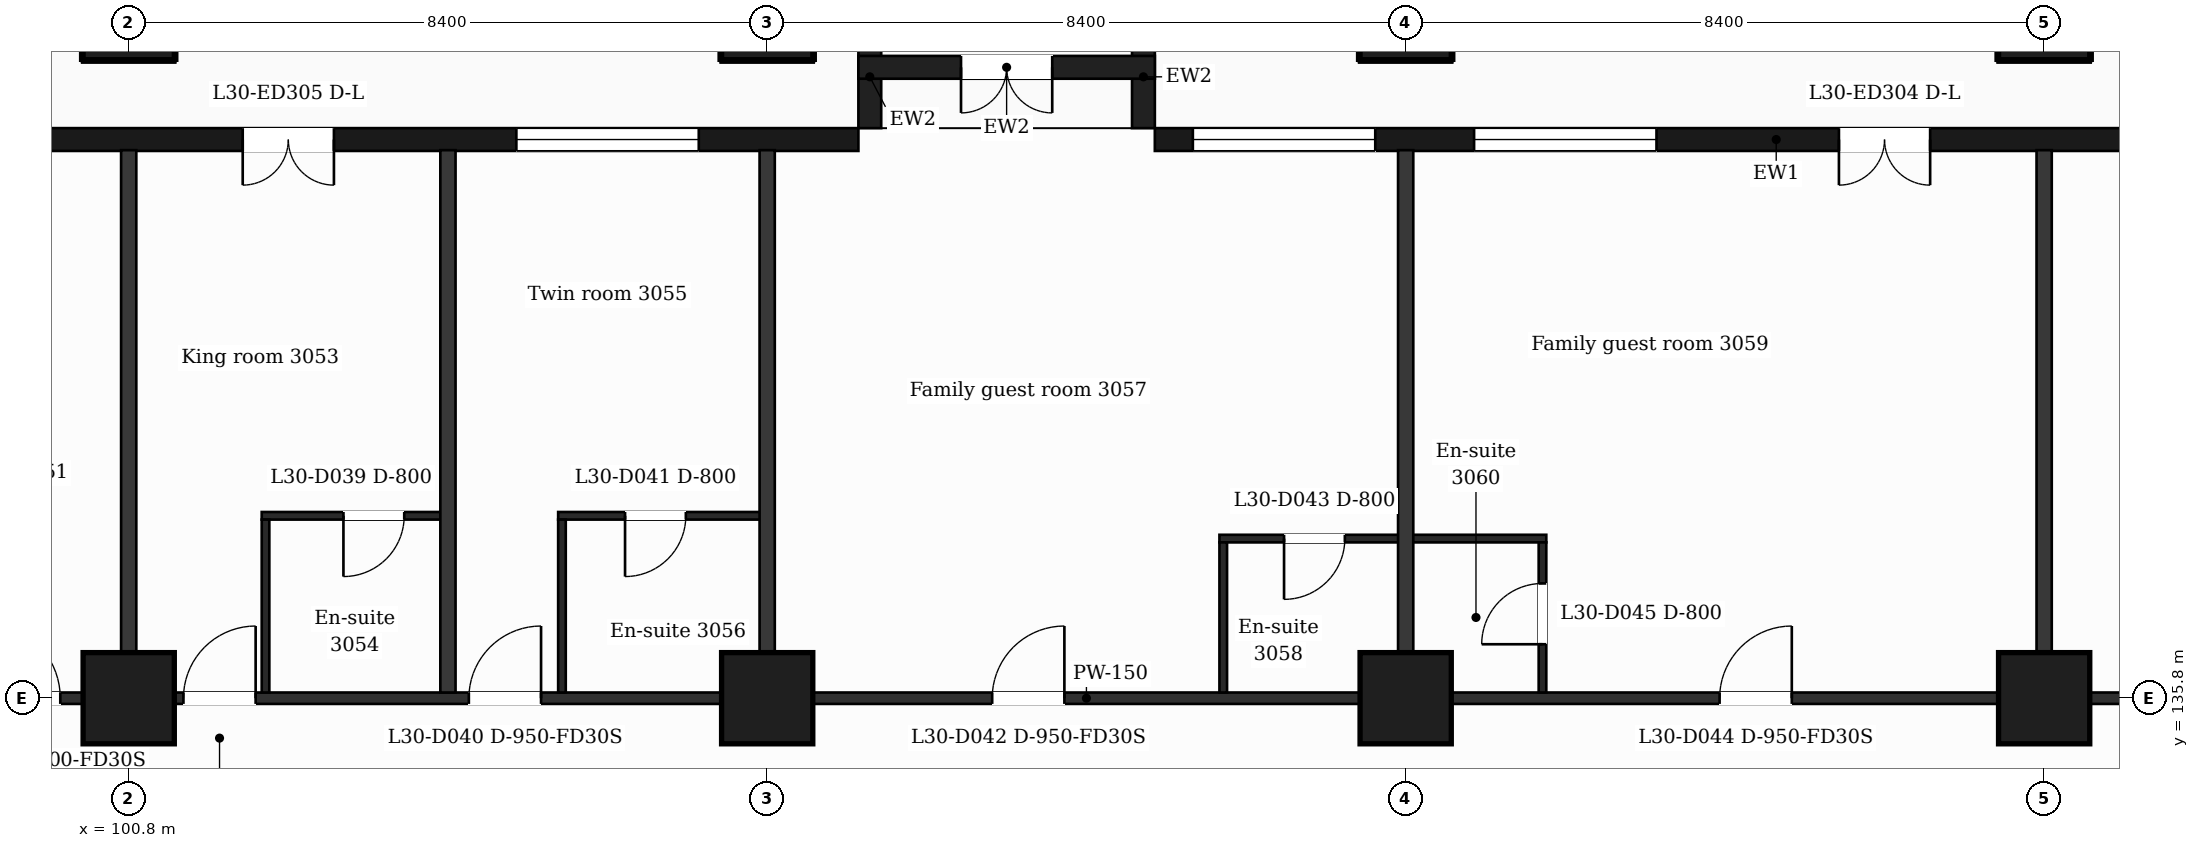
"""IFC4 building model, lengths in metres.
Left out: names, types, materials, properties, quantities, classifications, styles, units other than length and angle.
Written with IfcOpenShell. Run it as: python <this file> out.ifc"""

import sys

from ifc_helpers import new_model, si_unit, direction, frame, frame_2d, origin, origin_2d, place, context, subcontext, project, spatial, rectangle, extrude, element, fill, save


model = new_model("IFC4")
c1 = context("Model", 3, precision=1e-05, world=origin(), true_north=direction((0.0, 1.0)))
c2 = subcontext(c1, "Body", "Model", "MODEL_VIEW")
j1 = project(units=[si_unit("LENGTHUNIT", "METRE"), si_unit("PLANEANGLEUNIT", "RADIAN")], contexts=[c1])
p1 = place(None, origin())
s1 = spatial("IfcSite", under=j1, at=p1, CompositionType="ELEMENT")
p2 = place(p1, origin())
s2 = spatial("IfcBuilding", under=s1, at=p2, CompositionType="ELEMENT")
p3 = place(p2, frame((0.0, 0.0, 128.0)))
s3 = spatial("IfcBuildingStorey", under=s2, at=p3, CompositionType="ELEMENT", Elevation=128.0)
for number, where, z_axis, x_axis in (
    (1, (100.8, 135.8, 0.0), (0.0, 0.0, 1.0), (1.0, 0.0, 0.0)),
    (2, (109.2, 135.8, 0.0), (0.0, 0.0, 1.0), (1.0, 0.0, 0.0)),
    (3, (117.6, 135.8, 0.0), (0.0, 0.0, 1.0), (1.0, 0.0, 0.0)),
    (4, (126.0, 135.8, 0.0), (0.0, 0.0, 1.0), (1.0, 0.0, 0.0)),
    (5, (100.8, 144.8, 0.0), (0.0, 0.0, 1.0), (1.0, 0.0, 0.0)),
    (6, (109.2, 144.8, 0.0), (0.0, 0.0, 1.0), (1.0, 0.0, 0.0)),
    (7, (117.6, 144.8, 0.0), (0.0, 0.0, 1.0), (1.0, 0.0, 0.0)),
    (8, (126.0, 144.8, 0.0), (0.0, 0.0, 1.0), (1.0, 0.0, 0.0)),
):
    element("IfcColumn", number, at=place(p3, frame(where, z_axis=z_axis, x_axis=x_axis)), inside=s3, PredefinedType="COLUMN", context=c2, shape_type="SweptSolid", body=[
        extrude(rectangle(XDim=1.2, YDim=1.2, at=origin_2d()), origin(), (0.0, 0.0, 1.0), 3.7),
    ])
p4 = place(p3, frame((130.65, 143.15, 0.0), z_axis=(0.0, 0.0, 1.0), x_axis=(-1.0, 0.0, 0.0)))
e9 = element("IfcWall", 9, at=p4, inside=s3, PredefinedType="SOLIDWALL", context=c2, shape_type="SweptSolid", body=[
    extrude(rectangle(XDim=16.35, YDim=0.3, at=frame_2d((8.175, 0.0))), origin(), (0.0, 0.0, 1.0), 3.38),
])
p5 = place(p4, frame((1.95, 0.0, 0.9)))
e10 = element("IfcOpeningElement", 10, at=p5, cuts=e9, PredefinedType="OPENING", context=c2, shape_type="SweptSolid", body=[
    extrude(rectangle(XDim=1.2, YDim=2.1, at=frame_2d((0.6, 1.05))), frame((0.0, 0.16, 0.0), z_axis=(0.0, -1.0, 0.0), x_axis=(1.0, 0.0, 0.0)), (0.0, 0.0, 1.0), 0.32),
])
p6 = place(p4, frame((6.15, 0.0, 0.0)))
e11 = element("IfcOpeningElement", 11, at=p6, cuts=e9, PredefinedType="OPENING", context=c2, shape_type="SweptSolid", body=[
    extrude(rectangle(XDim=1.2, YDim=2.4, at=frame_2d((0.6, 1.2))), frame((0.0, 0.16, 0.0), z_axis=(0.0, -1.0, 0.0), x_axis=(1.0, 0.0, 0.0)), (0.0, 0.0, 1.0), 0.32),
])
p7 = place(p4, frame((9.75, 0.0, 0.9)))
e12 = element("IfcOpeningElement", 12, at=p7, cuts=e9, PredefinedType="OPENING", context=c2, shape_type="SweptSolid", body=[
    extrude(rectangle(XDim=2.4, YDim=2.1, at=frame_2d((1.2, 1.05))), frame((0.0, 0.16, 0.0), z_axis=(0.0, -1.0, 0.0), x_axis=(1.0, 0.0, 0.0)), (0.0, 0.0, 1.0), 0.32),
])
p8 = place(p4, frame((13.45, 0.0, 0.9)))
e13 = element("IfcOpeningElement", 13, at=p8, cuts=e9, PredefinedType="OPENING", context=c2, shape_type="SweptSolid", body=[
    extrude(rectangle(XDim=2.4, YDim=2.1, at=frame_2d((1.2, 1.05))), frame((0.0, 0.16, 0.0), z_axis=(0.0, -1.0, 0.0), x_axis=(1.0, 0.0, 0.0)), (0.0, 0.0, 1.0), 0.32),
])
p9 = place(p3, frame((110.4, 143.15, 0.0), z_axis=(0.0, 0.0, 1.0), x_axis=(-1.0, 0.0, 0.0)))
e14 = element("IfcWall", 14, at=p9, inside=s3, PredefinedType="SOLIDWALL", context=c2, shape_type="SweptSolid", body=[
    extrude(rectangle(XDim=14.4, YDim=0.3, at=frame_2d((7.2, 0.0))), origin(), (0.0, 0.0, 1.0), 3.38),
])
p10 = place(p9, frame((2.1, 0.0, 0.9)))
e15 = element("IfcOpeningElement", 15, at=p10, cuts=e14, PredefinedType="OPENING", context=c2, shape_type="SweptSolid", body=[
    extrude(rectangle(XDim=2.4, YDim=2.1, at=frame_2d((1.2, 1.05))), frame((0.0, 0.16, 0.0), z_axis=(0.0, -1.0, 0.0), x_axis=(1.0, 0.0, 0.0)), (0.0, 0.0, 1.0), 0.32),
])
p11 = place(p9, frame((6.9, 0.0, 0.0)))
e16 = element("IfcOpeningElement", 16, at=p11, cuts=e14, PredefinedType="OPENING", context=c2, shape_type="SweptSolid", body=[
    extrude(rectangle(XDim=1.2, YDim=2.4, at=frame_2d((0.6, 1.2))), frame((0.0, 0.16, 0.0), z_axis=(0.0, -1.0, 0.0), x_axis=(1.0, 0.0, 0.0)), (0.0, 0.0, 1.0), 0.32),
])
p12 = place(p9, frame((11.1, 0.0, 0.9)))
e17 = element("IfcOpeningElement", 17, at=p12, cuts=e14, PredefinedType="OPENING", context=c2, shape_type="SweptSolid", body=[
    extrude(rectangle(XDim=1.2, YDim=2.1, at=frame_2d((0.6, 1.05))), frame((0.0, 0.16, 0.0), z_axis=(0.0, -1.0, 0.0), x_axis=(1.0, 0.0, 0.0)), (0.0, 0.0, 1.0), 0.32),
])
for number, where, z_axis, x_axis in (
    (18, (114.15, 143.3, 0.0), (0.0, 0.0, 1.0), (0.0, 1.0, 0.0)),
    (19, (110.55, 143.3, 0.0), (0.0, 0.0, 1.0), (0.0, 1.0, 0.0)),
):
    element("IfcWall", number, at=place(p3, frame(where, z_axis=z_axis, x_axis=x_axis)), inside=s3, PredefinedType="SOLIDWALL", context=c2, shape_type="SweptSolid", body=[
        extrude(rectangle(XDim=1.35, YDim=0.3, at=frame_2d((0.675, 0.0))), origin(), (0.0, 0.0, 1.0), 3.38),
    ])
p13 = place(p3, frame((114.3, 144.1, 0.0), z_axis=(0.0, 0.0, 1.0), x_axis=(-1.0, 0.0, 0.0)))
e20 = element("IfcWall", 20, at=p13, inside=s3, PredefinedType="SOLIDWALL", context=c2, shape_type="SweptSolid", body=[
    extrude(rectangle(XDim=3.9, YDim=0.3, at=frame_2d((1.95, 0.0))), origin(), (0.0, 0.0, 1.0), 3.38),
])
p14 = place(p13, frame((1.35, 0.0, 0.0)))
e21 = element("IfcOpeningElement", 21, at=p14, cuts=e20, PredefinedType="OPENING", context=c2, shape_type="SweptSolid", body=[
    extrude(rectangle(XDim=1.2, YDim=2.4, at=frame_2d((0.6, 1.2))), frame((0.0, 0.16, 0.0), z_axis=(0.0, -1.0, 0.0), x_axis=(1.0, 0.0, 0.0)), (0.0, 0.0, 1.0), 0.32),
])
p15 = place(p3, frame((90.895, 135.8, 0.0), z_axis=(0.0, 0.0, 1.0), x_axis=(1.0, 0.0, 0.0)))
e22 = element("IfcWall", 22, at=p15, inside=s3, PredefinedType="PARTITIONING", context=c2, shape_type="SweptSolid", body=[
    extrude(rectangle(XDim=45.011, YDim=0.15, at=frame_2d((22.505, 0.0))), origin(), (0.0, 0.0, 1.0), 3.38),
])
p16 = place(p15, frame((8.005, 0.0, 0.0)))
e23 = element("IfcOpeningElement", 23, at=p16, cuts=e22, PredefinedType="OPENING", context=c2, shape_type="SweptSolid", body=[
    extrude(rectangle(XDim=1.0, YDim=2.1, at=frame_2d((0.5, 1.05))), frame((0.0, 0.085, 0.0), z_axis=(0.0, -1.0, 0.0), x_axis=(1.0, 0.0, 0.0)), (0.0, 0.0, 1.0), 0.17),
])
p17 = place(p15, frame((10.625, 0.0, 0.0)))
e24 = element("IfcOpeningElement", 24, at=p17, cuts=e22, PredefinedType="OPENING", context=c2, shape_type="SweptSolid", body=[
    extrude(rectangle(XDim=0.95, YDim=2.1, at=frame_2d((0.475, 1.05))), frame((0.0, 0.085, 0.0), z_axis=(0.0, -1.0, 0.0), x_axis=(1.0, 0.0, 0.0)), (0.0, 0.0, 1.0), 0.17),
])
p18 = place(p15, frame((14.38, 0.0, 0.0)))
e25 = element("IfcOpeningElement", 25, at=p18, cuts=e22, PredefinedType="OPENING", context=c2, shape_type="SweptSolid", body=[
    extrude(rectangle(XDim=0.95, YDim=2.1, at=frame_2d((0.475, 1.05))), frame((0.0, 0.085, 0.0), z_axis=(0.0, -1.0, 0.0), x_axis=(1.0, 0.0, 0.0)), (0.0, 0.0, 1.0), 0.17),
])
p19 = place(p15, frame((21.265, 0.0, 0.0)))
e26 = element("IfcOpeningElement", 26, at=p19, cuts=e22, PredefinedType="OPENING", context=c2, shape_type="SweptSolid", body=[
    extrude(rectangle(XDim=0.95, YDim=2.1, at=frame_2d((0.475, 1.05))), frame((0.0, 0.085, 0.0), z_axis=(0.0, -1.0, 0.0), x_axis=(1.0, 0.0, 0.0)), (0.0, 0.0, 1.0), 0.17),
])
p20 = place(p15, frame((30.835, 0.0, 0.0)))
e27 = element("IfcOpeningElement", 27, at=p20, cuts=e22, PredefinedType="OPENING", context=c2, shape_type="SweptSolid", body=[
    extrude(rectangle(XDim=0.95, YDim=2.1, at=frame_2d((0.475, 1.05))), frame((0.0, 0.085, 0.0), z_axis=(0.0, -1.0, 0.0), x_axis=(1.0, 0.0, 0.0)), (0.0, 0.0, 1.0), 0.17),
])
p21 = place(p15, frame((39.814, 0.0, 0.0)))
e28 = element("IfcOpeningElement", 28, at=p21, cuts=e22, PredefinedType="OPENING", context=c2, shape_type="SweptSolid", body=[
    extrude(rectangle(XDim=0.95, YDim=2.1, at=frame_2d((0.475, 1.05))), frame((0.0, 0.085, 0.0), z_axis=(0.0, -1.0, 0.0), x_axis=(1.0, 0.0, 0.0)), (0.0, 0.0, 1.0), 0.17),
])
p22 = place(p3, frame((115.15, 137.9, 0.0), z_axis=(0.0, 0.0, 1.0), x_axis=(1.0, 0.0, 0.0)))
e29 = element("IfcWall", 29, at=p22, inside=s3, PredefinedType="PARTITIONING", context=c2, shape_type="SweptSolid", body=[
    extrude(rectangle(XDim=4.3, YDim=0.1, at=frame_2d((2.15, 0.0))), origin(), (0.0, 0.0, 1.0), 3.38),
])
p23 = place(p22, frame((0.85, 0.0, 0.0)))
e30 = element("IfcOpeningElement", 30, at=p23, cuts=e29, PredefinedType="OPENING", context=c2, shape_type="SweptSolid", body=[
    extrude(rectangle(XDim=0.8, YDim=2.1, at=frame_2d((0.4, 1.05))), frame((0.0, 0.06, 0.0), z_axis=(0.0, -1.0, 0.0), x_axis=(1.0, 0.0, 0.0)), (0.0, 0.0, 1.0), 0.12),
])
p24 = place(p3, frame((102.55, 138.2, 0.0), z_axis=(0.0, 0.0, 1.0), x_axis=(1.0, 0.0, 0.0)))
e31 = element("IfcWall", 31, at=p24, inside=s3, PredefinedType="PARTITIONING", context=c2, shape_type="SweptSolid", body=[
    extrude(rectangle(XDim=2.45, YDim=0.1, at=frame_2d((1.225, 0.0))), origin(), (0.0, 0.0, 1.0), 3.38),
])
p25 = place(p24, frame((1.075, 0.0, 0.0)))
e32 = element("IfcOpeningElement", 32, at=p25, cuts=e31, PredefinedType="OPENING", context=c2, shape_type="SweptSolid", body=[
    extrude(rectangle(XDim=0.8, YDim=2.1, at=frame_2d((0.4, 1.05))), frame((0.0, 0.06, 0.0), z_axis=(0.0, -1.0, 0.0), x_axis=(1.0, 0.0, 0.0)), (0.0, 0.0, 1.0), 0.12),
])
p26 = place(p3, frame((106.45, 138.2, 0.0), z_axis=(0.0, 0.0, 1.0), x_axis=(1.0, 0.0, 0.0)))
e33 = element("IfcWall", 33, at=p26, inside=s3, PredefinedType="PARTITIONING", context=c2, shape_type="SweptSolid", body=[
    extrude(rectangle(XDim=2.75, YDim=0.1, at=frame_2d((1.375, 0.0))), origin(), (0.0, 0.0, 1.0), 3.38),
])
p27 = place(p26, frame((0.88, 0.0, 0.0)))
e34 = element("IfcOpeningElement", 34, at=p27, cuts=e33, PredefinedType="OPENING", context=c2, shape_type="SweptSolid", body=[
    extrude(rectangle(XDim=0.8, YDim=2.1, at=frame_2d((0.4, 1.05))), frame((0.0, 0.06, 0.0), z_axis=(0.0, -1.0, 0.0), x_axis=(1.0, 0.0, 0.0)), (0.0, 0.0, 1.0), 0.12),
])
p28 = place(p3, frame((100.8, 135.875, 0.0), z_axis=(0.0, 0.0, 1.0), x_axis=(0.0, 1.0, 0.0)))
e35 = element("IfcWall", 35, at=p28, inside=s3, PredefinedType="PARTITIONING", context=c2, shape_type="SweptSolid", body=[
    extrude(rectangle(XDim=7.135, YDim=0.2, at=frame_2d((3.567, 0.0))), origin(), (0.0, 0.0, 1.0), 3.38),
])
p29 = place(p3, frame((102.6, 135.875, 0.0), z_axis=(0.0, 0.0, 1.0), x_axis=(0.0, 1.0, 0.0)))
e36 = element("IfcWall", 36, at=p29, inside=s3, PredefinedType="PARTITIONING", context=c2, shape_type="SweptSolid", body=[
    extrude(rectangle(XDim=2.275, YDim=0.1, at=frame_2d((1.137, 0.0))), origin(), (0.0, 0.0, 1.0), 3.38),
])
p30 = place(p3, frame((105.0, 135.875, 0.0), z_axis=(0.0, 0.0, 1.0), x_axis=(0.0, 1.0, 0.0)))
e37 = element("IfcWall", 37, at=p30, inside=s3, PredefinedType="PARTITIONING", context=c2, shape_type="SweptSolid", body=[
    extrude(rectangle(XDim=7.135, YDim=0.2, at=frame_2d((3.567, 0.0))), origin(), (0.0, 0.0, 1.0), 3.38),
])
p31 = place(p3, frame((106.5, 135.875, 0.0), z_axis=(0.0, 0.0, 1.0), x_axis=(0.0, 1.0, 0.0)))
e38 = element("IfcWall", 38, at=p31, inside=s3, PredefinedType="PARTITIONING", context=c2, shape_type="SweptSolid", body=[
    extrude(rectangle(XDim=2.275, YDim=0.1, at=frame_2d((1.137, 0.0))), origin(), (0.0, 0.0, 1.0), 3.38),
])
p32 = place(p3, frame((109.2, 135.875, 0.0), z_axis=(0.0, 0.0, 1.0), x_axis=(0.0, 1.0, 0.0)))
e39 = element("IfcWall", 39, at=p32, inside=s3, PredefinedType="PARTITIONING", context=c2, shape_type="SweptSolid", body=[
    extrude(rectangle(XDim=7.135, YDim=0.2, at=frame_2d((3.567, 0.0))), origin(), (0.0, 0.0, 1.0), 3.38),
])
p33 = place(p3, frame((115.2, 135.875, 0.0), z_axis=(0.0, 0.0, 1.0), x_axis=(0.0, 1.0, 0.0)))
e40 = element("IfcWall", 40, at=p33, inside=s3, PredefinedType="PARTITIONING", context=c2, shape_type="SweptSolid", body=[
    extrude(rectangle(XDim=1.975, YDim=0.1, at=frame_2d((0.988, 0.0))), origin(), (0.0, 0.0, 1.0), 3.38),
])
p34 = place(p3, frame((117.6, 135.875, 0.0), z_axis=(0.0, 0.0, 1.0), x_axis=(0.0, 1.0, 0.0)))
e41 = element("IfcWall", 41, at=p34, inside=s3, PredefinedType="PARTITIONING", context=c2, shape_type="SweptSolid", body=[
    extrude(rectangle(XDim=7.135, YDim=0.2, at=frame_2d((3.567, 0.0))), origin(), (0.0, 0.0, 1.0), 3.38),
])
p35 = place(p3, frame((119.4, 135.875, 0.0), z_axis=(0.0, 0.0, 1.0), x_axis=(0.0, 1.0, 0.0)))
e42 = element("IfcWall", 42, at=p35, inside=s3, PredefinedType="PARTITIONING", context=c2, shape_type="SweptSolid", body=[
    extrude(rectangle(XDim=1.975, YDim=0.1, at=frame_2d((0.988, 0.0))), origin(), (0.0, 0.0, 1.0), 3.38),
])
p36 = place(p35, frame((0.635, 0.0, 0.0)))
e43 = element("IfcOpeningElement", 43, at=p36, cuts=e42, PredefinedType="OPENING", context=c2, shape_type="SweptSolid", body=[
    extrude(rectangle(XDim=0.8, YDim=2.1, at=frame_2d((0.4, 1.05))), frame((0.0, 0.06, 0.0), z_axis=(0.0, -1.0, 0.0), x_axis=(1.0, 0.0, 0.0)), (0.0, 0.0, 1.0), 0.12),
])
p37 = place(p3, frame((126.0, 135.875, 0.0), z_axis=(0.0, 0.0, 1.0), x_axis=(0.0, 1.0, 0.0)))
e44 = element("IfcWall", 44, at=p37, inside=s3, PredefinedType="PARTITIONING", context=c2, shape_type="SweptSolid", body=[
    extrude(rectangle(XDim=7.135, YDim=0.2, at=frame_2d((3.567, 0.0))), origin(), (0.0, 0.0, 1.0), 3.38),
])
p38 = place(p6, origin())
e45 = element("IfcDoor", 45, at=p38, inside=s3, OperationType="DOUBLE_DOOR_SINGLE_SWING", PredefinedType="DOOR", context=c2, shape_type="SweptSolid", body=[
    extrude(rectangle(XDim=1.2, YDim=2.4, at=frame_2d((0.6, 1.2))), frame((0.0, 0.025, 0.0), z_axis=(0.0, -1.0, 0.0), x_axis=(1.0, 0.0, 0.0)), (0.0, 0.0, 1.0), 0.05),
])
fill(e11, e45)
p39 = place(p7, origin())
e46 = element("IfcWindow", 46, at=p39, inside=s3, PartitioningType="SINGLE_PANEL", PredefinedType="WINDOW", context=c2, shape_type="SweptSolid", body=[
    extrude(rectangle(XDim=2.4, YDim=2.1, at=frame_2d((1.2, 1.05))), frame((0.0, 0.03, 0.0), z_axis=(0.0, -1.0, 0.0), x_axis=(1.0, 0.0, 0.0)), (0.0, 0.0, 1.0), 0.06),
])
fill(e12, e46)
p40 = place(p8, origin())
e47 = element("IfcWindow", 47, at=p40, inside=s3, PartitioningType="SINGLE_PANEL", PredefinedType="WINDOW", context=c2, shape_type="SweptSolid", body=[
    extrude(rectangle(XDim=2.4, YDim=2.1, at=frame_2d((1.2, 1.05))), frame((0.0, 0.03, 0.0), z_axis=(0.0, -1.0, 0.0), x_axis=(1.0, 0.0, 0.0)), (0.0, 0.0, 1.0), 0.06),
])
fill(e13, e47)
p41 = place(p10, origin())
e48 = element("IfcWindow", 48, at=p41, inside=s3, PartitioningType="SINGLE_PANEL", PredefinedType="WINDOW", context=c2, shape_type="SweptSolid", body=[
    extrude(rectangle(XDim=2.4, YDim=2.1, at=frame_2d((1.2, 1.05))), frame((0.0, 0.03, 0.0), z_axis=(0.0, -1.0, 0.0), x_axis=(1.0, 0.0, 0.0)), (0.0, 0.0, 1.0), 0.06),
])
fill(e15, e48)
p42 = place(p11, origin())
e49 = element("IfcDoor", 49, at=p42, inside=s3, OperationType="DOUBLE_DOOR_SINGLE_SWING", PredefinedType="DOOR", context=c2, shape_type="SweptSolid", body=[
    extrude(rectangle(XDim=1.2, YDim=2.4, at=frame_2d((0.6, 1.2))), frame((0.0, 0.025, 0.0), z_axis=(0.0, -1.0, 0.0), x_axis=(1.0, 0.0, 0.0)), (0.0, 0.0, 1.0), 0.05),
])
fill(e16, e49)
p43 = place(p14, origin())
e50 = element("IfcDoor", 50, at=p43, inside=s3, OperationType="DOUBLE_DOOR_SINGLE_SWING", PredefinedType="DOOR", context=c2, shape_type="SweptSolid", body=[
    extrude(rectangle(XDim=1.2, YDim=2.4, at=frame_2d((0.6, 1.2))), frame((0.0, 0.025, 0.0), z_axis=(0.0, -1.0, 0.0), x_axis=(1.0, 0.0, 0.0)), (0.0, 0.0, 1.0), 0.05),
])
fill(e21, e50)
p44 = place(p16, origin())
e51 = element("IfcDoor", 51, at=p44, inside=s3, OperationType="SINGLE_SWING_LEFT", PredefinedType="DOOR", context=c2, shape_type="SweptSolid", body=[
    extrude(rectangle(XDim=1.0, YDim=2.1, at=frame_2d((0.5, 1.05))), frame((0.0, 0.025, 0.0), z_axis=(0.0, -1.0, 0.0), x_axis=(1.0, 0.0, 0.0)), (0.0, 0.0, 1.0), 0.05),
])
fill(e23, e51)
p45 = place(p17, origin())
e52 = element("IfcDoor", 52, at=p45, inside=s3, OperationType="SINGLE_SWING_RIGHT", PredefinedType="DOOR", context=c2, shape_type="SweptSolid", body=[
    extrude(rectangle(XDim=0.95, YDim=2.1, at=frame_2d((0.475, 1.05))), frame((0.0, 0.025, 0.0), z_axis=(0.0, -1.0, 0.0), x_axis=(1.0, 0.0, 0.0)), (0.0, 0.0, 1.0), 0.05),
])
fill(e24, e52)
p46 = place(p25, origin())
e53 = element("IfcDoor", 53, at=p46, inside=s3, OperationType="SINGLE_SWING_LEFT", PredefinedType="DOOR", context=c2, shape_type="SweptSolid", body=[
    extrude(rectangle(XDim=0.8, YDim=2.1, at=frame_2d((0.4, 1.05))), frame((0.0, 0.025, 0.0), z_axis=(0.0, -1.0, 0.0), x_axis=(1.0, 0.0, 0.0)), (0.0, 0.0, 1.0), 0.05),
])
fill(e32, e53)
p47 = place(p18, origin())
e54 = element("IfcDoor", 54, at=p47, inside=s3, OperationType="SINGLE_SWING_RIGHT", PredefinedType="DOOR", context=c2, shape_type="SweptSolid", body=[
    extrude(rectangle(XDim=0.95, YDim=2.1, at=frame_2d((0.475, 1.05))), frame((0.0, 0.025, 0.0), z_axis=(0.0, -1.0, 0.0), x_axis=(1.0, 0.0, 0.0)), (0.0, 0.0, 1.0), 0.05),
])
fill(e25, e54)
p48 = place(p27, origin())
e55 = element("IfcDoor", 55, at=p48, inside=s3, OperationType="SINGLE_SWING_LEFT", PredefinedType="DOOR", context=c2, shape_type="SweptSolid", body=[
    extrude(rectangle(XDim=0.8, YDim=2.1, at=frame_2d((0.4, 1.05))), frame((0.0, 0.025, 0.0), z_axis=(0.0, -1.0, 0.0), x_axis=(1.0, 0.0, 0.0)), (0.0, 0.0, 1.0), 0.05),
])
fill(e34, e55)
p49 = place(p19, origin())
e56 = element("IfcDoor", 56, at=p49, inside=s3, OperationType="SINGLE_SWING_RIGHT", PredefinedType="DOOR", context=c2, shape_type="SweptSolid", body=[
    extrude(rectangle(XDim=0.95, YDim=2.1, at=frame_2d((0.475, 1.05))), frame((0.0, 0.025, 0.0), z_axis=(0.0, -1.0, 0.0), x_axis=(1.0, 0.0, 0.0)), (0.0, 0.0, 1.0), 0.05),
])
fill(e26, e56)
p50 = place(p23, origin())
e57 = element("IfcDoor", 57, at=p50, inside=s3, OperationType="SINGLE_SWING_LEFT", PredefinedType="DOOR", context=c2, shape_type="SweptSolid", body=[
    extrude(rectangle(XDim=0.8, YDim=2.1, at=frame_2d((0.4, 1.05))), frame((0.0, 0.025, 0.0), z_axis=(0.0, -1.0, 0.0), x_axis=(1.0, 0.0, 0.0)), (0.0, 0.0, 1.0), 0.05),
])
fill(e30, e57)
p51 = place(p20, origin())
e58 = element("IfcDoor", 58, at=p51, inside=s3, OperationType="SINGLE_SWING_RIGHT", PredefinedType="DOOR", context=c2, shape_type="SweptSolid", body=[
    extrude(rectangle(XDim=0.95, YDim=2.1, at=frame_2d((0.475, 1.05))), frame((0.0, 0.025, 0.0), z_axis=(0.0, -1.0, 0.0), x_axis=(1.0, 0.0, 0.0)), (0.0, 0.0, 1.0), 0.05),
])
fill(e27, e58)
p52 = place(p36, origin())
e59 = element("IfcDoor", 59, at=p52, inside=s3, OperationType="SINGLE_SWING_LEFT", PredefinedType="DOOR", context=c2, shape_type="SweptSolid", body=[
    extrude(rectangle(XDim=0.8, YDim=2.1, at=frame_2d((0.4, 1.05))), frame((0.0, 0.025, 0.0), z_axis=(0.0, -1.0, 0.0), x_axis=(1.0, 0.0, 0.0)), (0.0, 0.0, 1.0), 0.05),
])
fill(e43, e59)
save(model, sys.argv[1])
